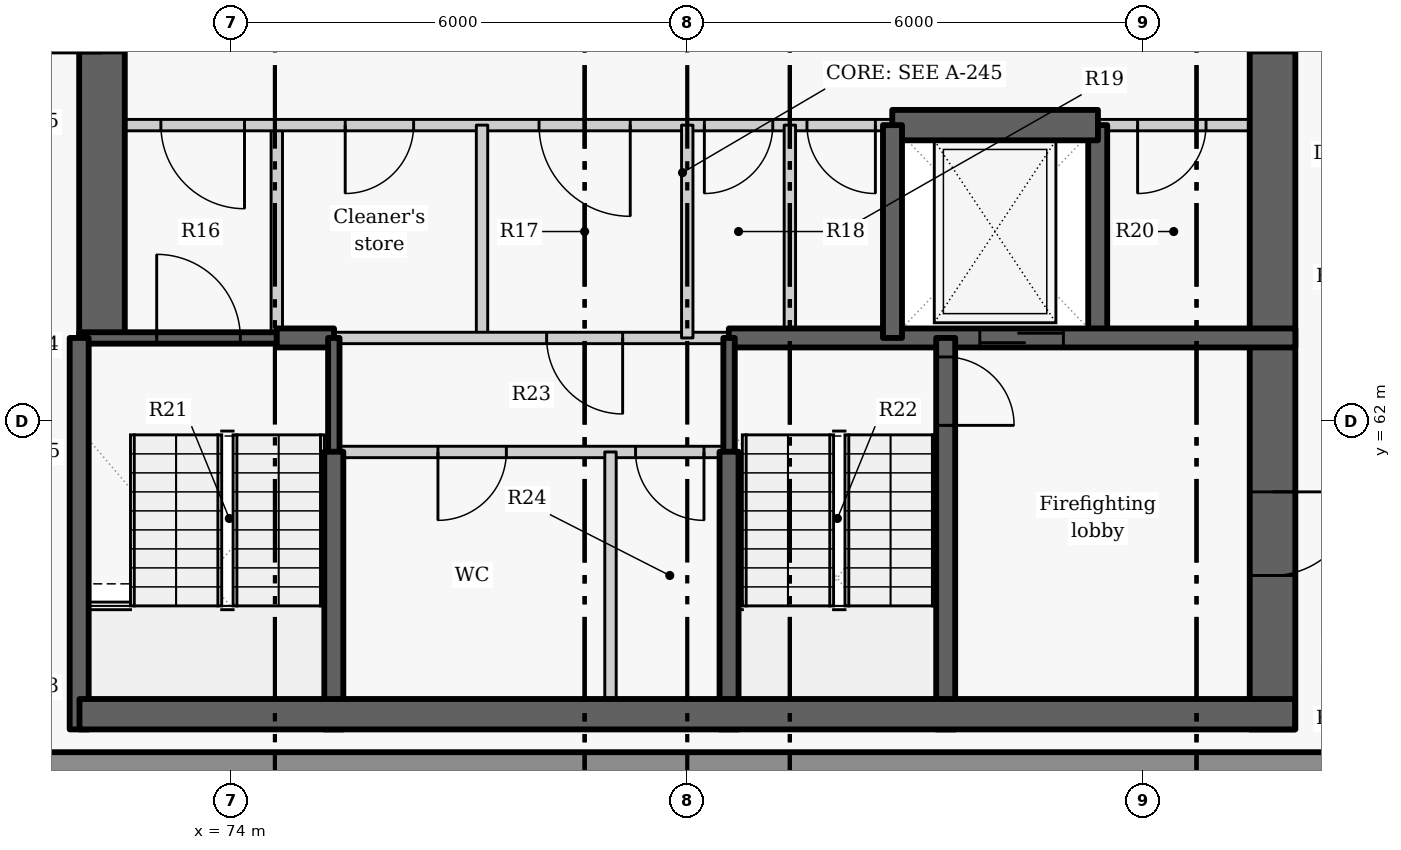
"""IFC4 building model, lengths in metres.
Left out: names, types, materials, properties, quantities, classifications, styles, units other than length and angle.
Written with IfcOpenShell. Run it as: python <this file> out.ifc"""

import sys

from ifc_helpers import new_model, si_unit, direction, frame, frame_2d, origin, place, context, subcontext, project, spatial, rectangle, extrude, element, fill, save


model = new_model("IFC4")
c1 = context("Model", 3, precision=1e-05, world=origin(), true_north=direction((0.0, 1.0)))
c2 = subcontext(c1, "Body", "Model", "MODEL_VIEW")
j1 = project(units=[si_unit("LENGTHUNIT", "METRE"), si_unit("PLANEANGLEUNIT", "RADIAN")], contexts=[c1])
p1 = place(None, origin())
s1 = spatial("IfcSite", under=j1, at=p1, CompositionType="ELEMENT")
p2 = place(p1, origin())
s2 = spatial("IfcBuilding", under=s1, at=p2, CompositionType="ELEMENT")
p3 = place(p2, frame((0.0, 0.0, 272.4)))
s3 = spatial("IfcBuildingStorey", under=s2, at=p3, CompositionType="ELEMENT", Elevation=272.4)
p4 = place(p3, frame((70.451, 57.5, 0.0), z_axis=(0.0, 0.0, 1.0), x_axis=(1.0, 0.0, 0.0)))
e1 = element("IfcWall", 1, at=p4, inside=s3, PredefinedType="SOLIDWALL", context=c2, shape_type="SweptSolid", body=[
    extrude(rectangle(XDim=19.093, YDim=0.3, at=frame_2d((9.546, 0.0))), origin(), (0.0, 0.0, 1.0), 2.725),
])
p5 = place(p3, frame((74.6, 63.1, 0.0), z_axis=(0.0, 0.0, 1.0), x_axis=(0.0, 1.0, 0.0)))
e2 = element("IfcWall", 2, at=p5, inside=s3, PredefinedType="PARTITIONING", context=c2, shape_type="SweptSolid", body=[
    extrude(rectangle(XDim=2.8, YDim=0.15, at=frame_2d((1.4, 0.0))), origin(), (0.0, 0.0, 1.0), 3.325),
])
p6 = place(p3, frame((72.3, 63.1, -0.275), z_axis=(0.0, 0.0, 1.0), x_axis=(0.0, 1.0, 0.0)))
e3 = element("IfcWall", 3, at=p6, inside=s3, PredefinedType="SHEAR", context=c2, shape_type="SweptSolid", body=[
    extrude(rectangle(XDim=9.1, YDim=0.6, at=frame_2d((4.55, 0.0))), origin(), (0.0, 0.0, 1.0), 3.6),
])
p7 = place(p6, frame((3.75, 0.0, 0.275)))
e4 = element("IfcOpeningElement", 4, at=p7, cuts=e3, PredefinedType="OPENING", context=c2, shape_type="SweptSolid", body=[
    extrude(rectangle(XDim=1.5, YDim=2.1, at=frame_2d((0.75, 1.05))), frame((0.0, 0.31, 0.0), z_axis=(0.0, -1.0, 0.0), x_axis=(1.0, 0.0, 0.0)), (0.0, 0.0, 1.0), 0.62),
])
p8 = place(p3, frame((85.4, 63.1, -0.275), z_axis=(0.0, 0.0, 1.0), x_axis=(0.0, 1.0, 0.0)))
e5 = element("IfcWall", 5, at=p8, inside=s3, PredefinedType="SHEAR", context=c2, shape_type="SweptSolid", body=[
    extrude(rectangle(XDim=2.8, YDim=0.25, at=frame_2d((1.4, 0.0))), origin(), (0.0, 0.0, 1.0), 3.6),
])
p9 = place(p3, frame((87.7, 72.2, -0.275), z_axis=(0.0, 0.0, 1.0), x_axis=(0.0, -1.0, 0.0)))
e6 = element("IfcWall", 6, at=p9, inside=s3, PredefinedType="SHEAR", context=c2, shape_type="SweptSolid", body=[
    extrude(rectangle(XDim=14.25, YDim=0.6, at=frame_2d((7.125, 0.0))), origin(), (0.0, 0.0, 1.0), 3.6),
])
p10 = place(p9, frame((3.85, 0.0, 0.275)))
e7 = element("IfcOpeningElement", 7, at=p10, cuts=e6, PredefinedType="OPENING", context=c2, shape_type="SweptSolid", body=[
    extrude(rectangle(XDim=1.5, YDim=2.1, at=frame_2d((0.75, 1.05))), frame((0.0, 0.31, 0.0), z_axis=(0.0, -1.0, 0.0), x_axis=(1.0, 0.0, 0.0)), (0.0, 0.0, 1.0), 0.62),
])
p11 = place(p9, frame((11.125, 0.0, 0.275)))
e8 = element("IfcOpeningElement", 8, at=p11, cuts=e6, PredefinedType="OPENING", context=c2, shape_type="SweptSolid", body=[
    extrude(rectangle(XDim=1.1, YDim=2.1, at=frame_2d((0.55, 1.05))), frame((0.0, 0.31, 0.0), z_axis=(0.0, -1.0, 0.0), x_axis=(1.0, 0.0, 0.0)), (0.0, 0.0, 1.0), 0.62),
])
p12 = place(p3, frame((82.703, 65.9, 0.0), z_axis=(0.0, 0.0, 1.0), x_axis=(-1.0, 0.0, 0.0)))
e9 = element("IfcWall", 9, at=p12, inside=s3, PredefinedType="PARTITIONING", context=c2, shape_type="SweptSolid", body=[
    extrude(rectangle(XDim=10.703, YDim=0.15, at=frame_2d((5.352, 0.0))), origin(), (0.0, 0.0, 1.0), 3.325),
])
p13 = place(p12, frame((8.528, 0.0, 0.0)))
e10 = element("IfcOpeningElement", 10, at=p13, cuts=e9, PredefinedType="OPENING", context=c2, shape_type="SweptSolid", body=[
    extrude(rectangle(XDim=1.1, YDim=2.1, at=frame_2d((0.55, 1.05))), frame((0.0, 0.085, 0.0), z_axis=(0.0, -1.0, 0.0), x_axis=(1.0, 0.0, 0.0)), (0.0, 0.0, 1.0), 0.17),
])
p14 = place(p12, frame((6.303, 0.0, 0.0)))
e11 = element("IfcOpeningElement", 11, at=p14, cuts=e9, PredefinedType="OPENING", context=c2, shape_type="SweptSolid", body=[
    extrude(rectangle(XDim=0.9, YDim=2.1, at=frame_2d((0.45, 1.05))), frame((0.0, 0.085, 0.0), z_axis=(0.0, -1.0, 0.0), x_axis=(1.0, 0.0, 0.0)), (0.0, 0.0, 1.0), 0.17),
])
p15 = place(p12, frame((3.453, 0.0, 0.0)))
e12 = element("IfcOpeningElement", 12, at=p15, cuts=e9, PredefinedType="OPENING", context=c2, shape_type="SweptSolid", body=[
    extrude(rectangle(XDim=1.2, YDim=2.1, at=frame_2d((0.6, 1.05))), frame((0.0, 0.085, 0.0), z_axis=(0.0, -1.0, 0.0), x_axis=(1.0, 0.0, 0.0)), (0.0, 0.0, 1.0), 0.17),
])
p16 = place(p12, frame((1.578, 0.0, 0.0)))
e13 = element("IfcOpeningElement", 13, at=p16, cuts=e9, PredefinedType="OPENING", context=c2, shape_type="SweptSolid", body=[
    extrude(rectangle(XDim=0.9, YDim=2.1, at=frame_2d((0.45, 1.05))), frame((0.0, 0.085, 0.0), z_axis=(0.0, -1.0, 0.0), x_axis=(1.0, 0.0, 0.0)), (0.0, 0.0, 1.0), 0.17),
])
p17 = place(p12, frame((0.228, 0.0, 0.0)))
e14 = element("IfcOpeningElement", 14, at=p17, cuts=e9, PredefinedType="OPENING", context=c2, shape_type="SweptSolid", body=[
    extrude(rectangle(XDim=0.9, YDim=2.1, at=frame_2d((0.45, 1.05))), frame((0.0, 0.085, 0.0), z_axis=(0.0, -1.0, 0.0), x_axis=(1.0, 0.0, 0.0)), (0.0, 0.0, 1.0), 0.17),
])
p18 = place(p3, frame((88.0, 65.9, 0.0), z_axis=(0.0, 0.0, 1.0), x_axis=(-1.0, 0.0, 0.0)))
e15 = element("IfcWall", 15, at=p18, inside=s3, PredefinedType="PARTITIONING", context=c2, shape_type="SweptSolid", body=[
    extrude(rectangle(XDim=2.603, YDim=0.15, at=frame_2d((1.302, 0.0))), origin(), (0.0, 0.0, 1.0), 3.325),
])
p19 = place(p18, frame((1.175, 0.0, 0.0)))
e16 = element("IfcOpeningElement", 16, at=p19, cuts=e15, PredefinedType="OPENING", context=c2, shape_type="SweptSolid", body=[
    extrude(rectangle(XDim=0.9, YDim=2.1, at=frame_2d((0.45, 1.05))), frame((0.0, 0.085, 0.0), z_axis=(0.0, -1.0, 0.0), x_axis=(1.0, 0.0, 0.0)), (0.0, 0.0, 1.0), 0.17),
])
p20 = place(p3, frame((82.697, 65.9, -0.275), z_axis=(0.0, 0.0, 1.0), x_axis=(1.0, 0.0, 0.0)))
e17 = element("IfcWall", 17, at=p20, inside=s3, PredefinedType="SHEAR", context=c2, shape_type="SweptSolid", body=[
    extrude(rectangle(XDim=2.706, YDim=0.4, at=frame_2d((1.353, 0.0))), origin(), (0.0, 0.0, 1.0), 3.6),
])
p21 = place(p3, frame((72.0, 63.1, -0.275), z_axis=(0.0, 0.0, 1.0), x_axis=(1.0, 0.0, 0.0)))
e18 = element("IfcWall", 18, at=p21, inside=s3, PredefinedType="SHEAR", context=c2, shape_type="SweptSolid", body=[
    extrude(rectangle(XDim=2.6, YDim=0.15, at=frame_2d((1.3, 0.0))), origin(), (0.0, 0.0, 1.0), 3.6),
])
p22 = place(p21, frame((1.02, 0.0, 0.275)))
e19 = element("IfcOpeningElement", 19, at=p22, cuts=e18, PredefinedType="OPENING", context=c2, shape_type="SweptSolid", body=[
    extrude(rectangle(XDim=1.1, YDim=2.1, at=frame_2d((0.55, 1.05))), frame((0.0, 0.085, 0.0), z_axis=(0.0, -1.0, 0.0), x_axis=(1.0, 0.0, 0.0)), (0.0, 0.0, 1.0), 0.17),
])
p23 = place(p3, frame((77.3, 63.1, 0.0), z_axis=(0.0, 0.0, 1.0), x_axis=(0.0, 1.0, 0.0)))
e20 = element("IfcWall", 20, at=p23, inside=s3, PredefinedType="PARTITIONING", context=c2, shape_type="SweptSolid", body=[
    extrude(rectangle(XDim=2.8, YDim=0.15, at=frame_2d((1.4, 0.0))), origin(), (0.0, 0.0, 1.0), 3.325),
])
p24 = place(p3, frame((74.6, 63.1, -0.275), z_axis=(0.0, 0.0, 1.0), x_axis=(1.0, 0.0, 0.0)))
e21 = element("IfcWall", 21, at=p24, inside=s3, PredefinedType="SHEAR", context=c2, shape_type="SweptSolid", body=[
    extrude(rectangle(XDim=0.753, YDim=0.25, at=frame_2d((0.376, 0.0))), origin(), (0.0, 0.0, 1.0), 3.6),
])
p25 = place(p3, frame((80.547, 63.1, -0.275), z_axis=(0.0, 0.0, 1.0), x_axis=(1.0, 0.0, 0.0)))
e22 = element("IfcWall", 22, at=p25, inside=s3, PredefinedType="SHEAR", context=c2, shape_type="SweptSolid", body=[
    extrude(rectangle(XDim=7.453, YDim=0.25, at=frame_2d((3.727, 0.0))), origin(), (0.0, 0.0, 1.0), 3.6),
])
p26 = place(p25, frame((3.302, 0.0, 0.275)))
e23 = element("IfcOpeningElement", 23, at=p26, cuts=e22, PredefinedType="OPENING", context=c2, shape_type="SweptSolid", body=[
    extrude(rectangle(XDim=1.1, YDim=2.1, at=frame_2d((0.55, 1.05))), frame((0.0, 0.135, 0.0), z_axis=(0.0, -1.0, 0.0), x_axis=(1.0, 0.0, 0.0)), (0.0, 0.0, 1.0), 0.27),
])
p27 = place(p3, frame((80.553, 63.1, 0.0), z_axis=(0.0, 0.0, 1.0), x_axis=(-1.0, 0.0, 0.0)))
e24 = element("IfcWall", 24, at=p27, inside=s3, PredefinedType="PARTITIONING", context=c2, shape_type="SweptSolid", body=[
    extrude(rectangle(XDim=5.206, YDim=0.15, at=frame_2d((2.603, 0.0))), origin(), (0.0, 0.0, 1.0), 3.325),
])
p28 = place(p27, frame((1.403, 0.0, 0.0)))
e25 = element("IfcOpeningElement", 25, at=p28, cuts=e24, PredefinedType="OPENING", context=c2, shape_type="SweptSolid", body=[
    extrude(rectangle(XDim=1.0, YDim=2.1, at=frame_2d((0.5, 1.05))), frame((0.0, 0.085, 0.0), z_axis=(0.0, -1.0, 0.0), x_axis=(1.0, 0.0, 0.0)), (0.0, 0.0, 1.0), 0.17),
])
for number, where, z_axis, x_axis in (
    (26, (80.0, 63.1, 0.0), (0.0, 0.0, 1.0), (0.0, 1.0, 0.0)),
    (27, (81.35, 63.1, 0.0), (0.0, 0.0, 1.0), (0.0, 1.0, 0.0)),
):
    element("IfcWall", number, at=place(p3, frame(where, z_axis=z_axis, x_axis=x_axis)), inside=s3, PredefinedType="PARTITIONING", context=c2, shape_type="SweptSolid", body=[
        extrude(rectangle(XDim=2.8, YDim=0.15, at=frame_2d((1.4, 0.0))), origin(), (0.0, 0.0, 1.0), 3.325),
    ])
p29 = place(p3, frame((82.7, 63.1, -0.275), z_axis=(0.0, 0.0, 1.0), x_axis=(0.0, 1.0, 0.0)))
e28 = element("IfcWall", 28, at=p29, inside=s3, PredefinedType="SHEAR", context=c2, shape_type="SweptSolid", body=[
    extrude(rectangle(XDim=2.8, YDim=0.25, at=frame_2d((1.4, 0.0))), origin(), (0.0, 0.0, 1.0), 3.6),
])
p30 = place(p3, frame((75.35, 61.597, -0.275), z_axis=(0.0, 0.0, 1.0), x_axis=(0.0, 1.0, 0.0)))
e29 = element("IfcWall", 29, at=p30, inside=s3, PredefinedType="SHEAR", context=c2, shape_type="SweptSolid", body=[
    extrude(rectangle(XDim=1.503, YDim=0.15, at=frame_2d((0.751, 0.0))), origin(), (0.0, 0.0, 1.0), 3.6),
])
p31 = place(p3, frame((75.35, 57.95, -0.275), z_axis=(0.0, 0.0, 1.0), x_axis=(0.0, 1.0, 0.0)))
e30 = element("IfcWall", 30, at=p31, inside=s3, PredefinedType="SHEAR", context=c2, shape_type="SweptSolid", body=[
    extrude(rectangle(XDim=3.653, YDim=0.25, at=frame_2d((1.827, 0.0))), origin(), (0.0, 0.0, 1.0), 3.6),
])
p32 = place(p3, frame((72.0, 57.95, -0.275), z_axis=(0.0, 0.0, 1.0), x_axis=(0.0, 1.0, 0.0)))
e31 = element("IfcWall", 31, at=p32, inside=s3, PredefinedType="SHEAR", context=c2, shape_type="SweptSolid", body=[
    extrude(rectangle(XDim=5.15, YDim=0.25, at=frame_2d((2.575, 0.0))), origin(), (0.0, 0.0, 1.0), 3.6),
])
p33 = place(p3, frame((83.4, 63.1, -0.275), z_axis=(0.0, 0.0, 1.0), x_axis=(0.0, -1.0, 0.0)))
e32 = element("IfcWall", 32, at=p33, inside=s3, PredefinedType="SHEAR", context=c2, shape_type="SweptSolid", body=[
    extrude(rectangle(XDim=5.15, YDim=0.25, at=frame_2d((2.575, 0.0))), origin(), (0.0, 0.0, 1.0), 3.6),
])
p34 = place(p33, frame((0.25, 0.0, 0.275)))
e33 = element("IfcOpeningElement", 33, at=p34, cuts=e32, PredefinedType="OPENING", context=c2, shape_type="SweptSolid", body=[
    extrude(rectangle(XDim=0.9, YDim=2.1, at=frame_2d((0.45, 1.05))), frame((0.0, 0.135, 0.0), z_axis=(0.0, -1.0, 0.0), x_axis=(1.0, 0.0, 0.0)), (0.0, 0.0, 1.0), 0.27),
])
p35 = place(p3, frame((80.55, 61.597, -0.275), z_axis=(0.0, 0.0, 1.0), x_axis=(0.0, 1.0, 0.0)))
e34 = element("IfcWall", 34, at=p35, inside=s3, PredefinedType="SHEAR", context=c2, shape_type="SweptSolid", body=[
    extrude(rectangle(XDim=1.503, YDim=0.15, at=frame_2d((0.751, 0.0))), origin(), (0.0, 0.0, 1.0), 3.6),
])
p36 = place(p3, frame((80.55, 57.95, -0.275), z_axis=(0.0, 0.0, 1.0), x_axis=(0.0, 1.0, 0.0)))
e35 = element("IfcWall", 35, at=p36, inside=s3, PredefinedType="SHEAR", context=c2, shape_type="SweptSolid", body=[
    extrude(rectangle(XDim=3.653, YDim=0.25, at=frame_2d((1.827, 0.0))), origin(), (0.0, 0.0, 1.0), 3.6),
])
p37 = place(p3, frame((80.55, 61.6, 0.0), z_axis=(0.0, 0.0, 1.0), x_axis=(-1.0, 0.0, 0.0)))
e36 = element("IfcWall", 36, at=p37, inside=s3, PredefinedType="PARTITIONING", context=c2, shape_type="SweptSolid", body=[
    extrude(rectangle(XDim=5.2, YDim=0.15, at=frame_2d((2.6, 0.0))), origin(), (0.0, 0.0, 1.0), 3.325),
])
p38 = place(p37, frame((2.93, 0.0, 0.0)))
e37 = element("IfcOpeningElement", 37, at=p38, cuts=e36, PredefinedType="OPENING", context=c2, shape_type="SweptSolid", body=[
    extrude(rectangle(XDim=0.9, YDim=2.1, at=frame_2d((0.45, 1.05))), frame((0.0, 0.085, 0.0), z_axis=(0.0, -1.0, 0.0), x_axis=(1.0, 0.0, 0.0)), (0.0, 0.0, 1.0), 0.17),
])
p39 = place(p37, frame((0.33, 0.0, 0.0)))
e38 = element("IfcOpeningElement", 38, at=p39, cuts=e36, PredefinedType="OPENING", context=c2, shape_type="SweptSolid", body=[
    extrude(rectangle(XDim=0.9, YDim=2.1, at=frame_2d((0.45, 1.05))), frame((0.0, 0.085, 0.0), z_axis=(0.0, -1.0, 0.0), x_axis=(1.0, 0.0, 0.0)), (0.0, 0.0, 1.0), 0.17),
])
p40 = place(p3, frame((78.99, 57.95, 0.0), z_axis=(0.0, 0.0, 1.0), x_axis=(0.0, 1.0, 0.0)))
e39 = element("IfcWall", 39, at=p40, inside=s3, PredefinedType="PARTITIONING", context=c2, shape_type="SweptSolid", body=[
    extrude(rectangle(XDim=3.65, YDim=0.15, at=frame_2d((1.825, 0.0))), origin(), (0.0, 0.0, 1.0), 3.325),
])
p41 = place(p3, frame((72.004, 58.15, -0.275), z_axis=(0.0, 0.0, 1.0), x_axis=(1.0, 0.0, 0.0)))
e40 = element("IfcWall", 40, at=p41, inside=s3, PredefinedType="SHEAR", context=c2, shape_type="SweptSolid", body=[
    extrude(rectangle(XDim=15.992, YDim=0.4, at=frame_2d((7.996, 0.0))), origin(), (0.0, 0.0, 1.0), 3.6),
])
p42 = place(p13, origin())
e41 = element("IfcDoor", 41, at=p42, inside=s3, OperationType="SINGLE_SWING_LEFT", PredefinedType="DOOR", context=c2, shape_type="SweptSolid", body=[
    extrude(rectangle(XDim=1.1, YDim=2.1, at=frame_2d((0.55, 1.05))), frame((0.0, 0.025, 0.0), z_axis=(0.0, -1.0, 0.0), x_axis=(1.0, 0.0, 0.0)), (0.0, 0.0, 1.0), 0.05),
])
fill(e10, e41)
p43 = place(p14, origin())
e42 = element("IfcDoor", 42, at=p43, inside=s3, OperationType="SINGLE_SWING_RIGHT", PredefinedType="DOOR", context=c2, shape_type="SweptSolid", body=[
    extrude(rectangle(XDim=0.9, YDim=2.1, at=frame_2d((0.45, 1.05))), frame((0.0, 0.025, 0.0), z_axis=(0.0, -1.0, 0.0), x_axis=(1.0, 0.0, 0.0)), (0.0, 0.0, 1.0), 0.05),
])
fill(e11, e42)
p44 = place(p15, origin())
e43 = element("IfcDoor", 43, at=p44, inside=s3, OperationType="DOUBLE_DOOR_SINGLE_SWING", PredefinedType="DOOR", context=c2, shape_type="SweptSolid", body=[
    extrude(rectangle(XDim=1.2, YDim=2.1, at=frame_2d((0.6, 1.05))), frame((0.0, 0.025, 0.0), z_axis=(0.0, -1.0, 0.0), x_axis=(1.0, 0.0, 0.0)), (0.0, 0.0, 1.0), 0.05),
])
fill(e12, e43)
p45 = place(p16, origin())
e44 = element("IfcDoor", 44, at=p45, inside=s3, OperationType="SINGLE_SWING_RIGHT", PredefinedType="DOOR", context=c2, shape_type="SweptSolid", body=[
    extrude(rectangle(XDim=0.9, YDim=2.1, at=frame_2d((0.45, 1.05))), frame((0.0, 0.025, 0.0), z_axis=(0.0, -1.0, 0.0), x_axis=(1.0, 0.0, 0.0)), (0.0, 0.0, 1.0), 0.05),
])
fill(e13, e44)
p46 = place(p17, origin())
e45 = element("IfcDoor", 45, at=p46, inside=s3, OperationType="SINGLE_SWING_LEFT", PredefinedType="DOOR", context=c2, shape_type="SweptSolid", body=[
    extrude(rectangle(XDim=0.9, YDim=2.1, at=frame_2d((0.45, 1.05))), frame((0.0, 0.025, 0.0), z_axis=(0.0, -1.0, 0.0), x_axis=(1.0, 0.0, 0.0)), (0.0, 0.0, 1.0), 0.05),
])
fill(e14, e45)
p47 = place(p26, origin())
e46 = element("IfcDoor", 46, at=p47, inside=s3, OperationType="SLIDING_TO_LEFT", PredefinedType="DOOR", context=c2, shape_type="SweptSolid", body=[
    extrude(rectangle(XDim=1.1, YDim=2.1, at=frame_2d((0.55, 1.05))), frame((0.0, 0.025, 0.0), z_axis=(0.0, -1.0, 0.0), x_axis=(1.0, 0.0, 0.0)), (0.0, 0.0, 1.0), 0.05),
])
fill(e23, e46)
p48 = place(p19, origin())
e47 = element("IfcDoor", 47, at=p48, inside=s3, OperationType="SINGLE_SWING_RIGHT", PredefinedType="DOOR", context=c2, shape_type="SweptSolid", body=[
    extrude(rectangle(XDim=0.9, YDim=2.1, at=frame_2d((0.45, 1.05))), frame((0.0, 0.025, 0.0), z_axis=(0.0, -1.0, 0.0), x_axis=(1.0, 0.0, 0.0)), (0.0, 0.0, 1.0), 0.05),
])
fill(e16, e47)
p49 = place(p28, origin())
e48 = element("IfcDoor", 48, at=p49, inside=s3, OperationType="SINGLE_SWING_LEFT", PredefinedType="DOOR", context=c2, shape_type="SweptSolid", body=[
    extrude(rectangle(XDim=1.0, YDim=2.1, at=frame_2d((0.5, 1.05))), frame((0.0, 0.025, 0.0), z_axis=(0.0, -1.0, 0.0), x_axis=(1.0, 0.0, 0.0)), (0.0, 0.0, 1.0), 0.05),
])
fill(e25, e48)
p50 = place(p38, origin())
e49 = element("IfcDoor", 49, at=p50, inside=s3, OperationType="SINGLE_SWING_RIGHT", PredefinedType="DOOR", context=c2, shape_type="SweptSolid", body=[
    extrude(rectangle(XDim=0.9, YDim=2.1, at=frame_2d((0.45, 1.05))), frame((0.0, 0.025, 0.0), z_axis=(0.0, -1.0, 0.0), x_axis=(1.0, 0.0, 0.0)), (0.0, 0.0, 1.0), 0.05),
])
fill(e37, e49)
p51 = place(p39, origin())
e50 = element("IfcDoor", 50, at=p51, inside=s3, OperationType="SINGLE_SWING_LEFT", PredefinedType="DOOR", context=c2, shape_type="SweptSolid", body=[
    extrude(rectangle(XDim=0.9, YDim=2.1, at=frame_2d((0.45, 1.05))), frame((0.0, 0.025, 0.0), z_axis=(0.0, -1.0, 0.0), x_axis=(1.0, 0.0, 0.0)), (0.0, 0.0, 1.0), 0.05),
])
fill(e38, e50)
p52 = place(p22, origin())
e51 = element("IfcDoor", 51, at=p52, inside=s3, OperationType="SINGLE_SWING_LEFT", PredefinedType="DOOR", context=c2, shape_type="SweptSolid", body=[
    extrude(rectangle(XDim=1.1, YDim=2.1, at=frame_2d((0.55, 1.05))), frame((0.0, 0.025, 0.0), z_axis=(0.0, -1.0, 0.0), x_axis=(1.0, 0.0, 0.0)), (0.0, 0.0, 1.0), 0.05),
])
fill(e19, e51)
p53 = place(p34, origin())
e52 = element("IfcDoor", 52, at=p53, inside=s3, OperationType="SINGLE_SWING_RIGHT", PredefinedType="DOOR", context=c2, shape_type="SweptSolid", body=[
    extrude(rectangle(XDim=0.9, YDim=2.1, at=frame_2d((0.45, 1.05))), frame((0.0, 0.025, 0.0), z_axis=(0.0, -1.0, 0.0), x_axis=(1.0, 0.0, 0.0)), (0.0, 0.0, 1.0), 0.05),
])
fill(e33, e52)
p54 = place(p10, origin())
e53 = element("IfcDoor", 53, at=p54, inside=s3, OperationType="DOUBLE_DOOR_SINGLE_SWING", PredefinedType="DOOR", context=c2, shape_type="SweptSolid", body=[
    extrude(rectangle(XDim=1.5, YDim=2.1, at=frame_2d((0.75, 1.05))), frame((0.0, 0.025, 0.0), z_axis=(0.0, -1.0, 0.0), x_axis=(1.0, 0.0, 0.0)), (0.0, 0.0, 1.0), 0.05),
])
fill(e7, e53)
p55 = place(p11, origin())
e54 = element("IfcDoor", 54, at=p55, inside=s3, OperationType="SINGLE_SWING_LEFT", PredefinedType="DOOR", context=c2, shape_type="SweptSolid", body=[
    extrude(rectangle(XDim=1.1, YDim=2.1, at=frame_2d((0.55, 1.05))), frame((0.0, 0.025, 0.0), z_axis=(0.0, -1.0, 0.0), x_axis=(1.0, 0.0, 0.0)), (0.0, 0.0, 1.0), 0.05),
])
fill(e8, e54)
save(model, sys.argv[1])
